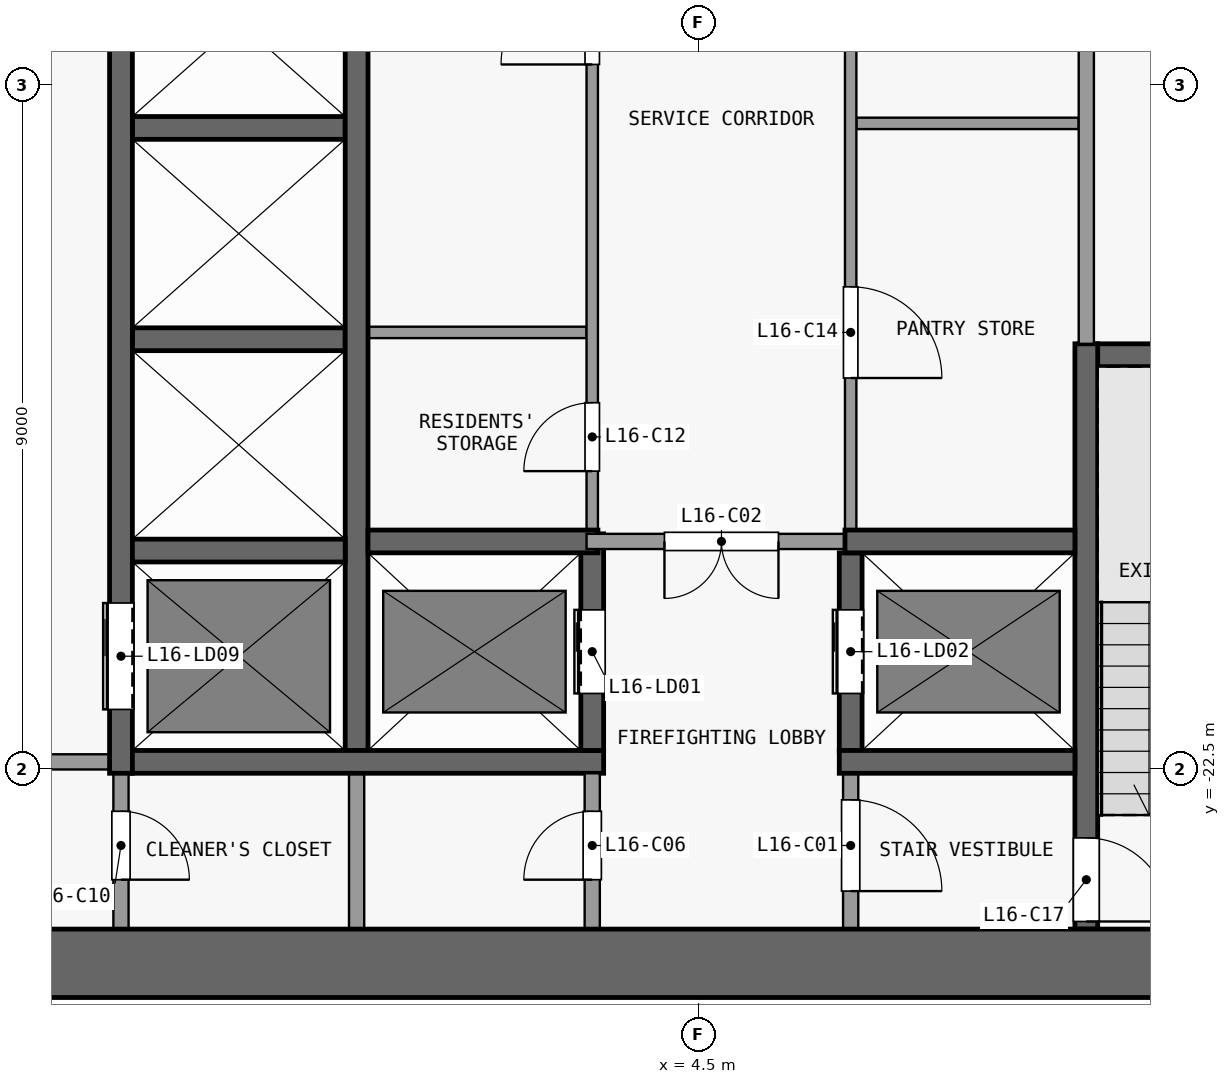
"""IFC4 building model, lengths in metres.
Left out: names, types, materials, properties, quantities, classifications, styles, units other than length and angle.
Written with IfcOpenShell. Run it as: python <this file> out.ifc"""

import sys

from ifc_helpers import new_model, si_unit, direction, frame, frame_2d, origin, place, context, subcontext, project, spatial, rectangle, extrude, element, fill, save


model = new_model("IFC4")
c1 = context("Model", 3, precision=1e-05, world=origin(), true_north=direction((0.0, 1.0)))
c2 = subcontext(c1, "Body", "Model", "MODEL_VIEW")
j1 = project(units=[si_unit("LENGTHUNIT", "METRE"), si_unit("PLANEANGLEUNIT", "RADIAN")], contexts=[c1])
p1 = place(None, origin())
s1 = spatial("IfcSite", under=j1, at=p1, CompositionType="ELEMENT")
p2 = place(p1, origin())
s2 = spatial("IfcBuilding", under=s1, at=p2, CompositionType="ELEMENT")
p3 = place(p2, frame((0.0, 0.0, 68.5)))
s3 = spatial("IfcBuildingStorey", under=s2, at=p3, CompositionType="ELEMENT", Elevation=68.5)
p4 = place(p3, frame((-13.5, -25.05, 0.0), z_axis=(0.0, 0.0, 1.0), x_axis=(1.0, 0.0, 0.0)))
e1 = element("IfcWall", 1, at=p4, inside=s3, PredefinedType="SHEAR", context=c2, shape_type="SweptSolid", body=[
    extrude(rectangle(XDim=27.0, YDim=0.9, at=frame_2d((13.5, 0.0))), origin(), (0.0, 0.0, 1.0), 3.3),
])
p5 = place(p3, frame((-3.25, -22.4, 0.0), z_axis=(0.0, 0.0, 1.0), x_axis=(-1.0, 0.0, 0.0)))
e2 = element("IfcWall", 2, at=p5, inside=s3, PredefinedType="PARTITIONING", context=c2, shape_type="SweptSolid", body=[
    extrude(rectangle(XDim=3.1, YDim=0.2, at=frame_2d((1.55, 0.0))), origin(), (0.0, 0.0, 1.0), 3.3),
])
p6 = place(p5, frame((0.8, 0.0, 0.0)))
e3 = element("IfcOpeningElement", 3, at=p6, cuts=e2, PredefinedType="OPENING", context=c2, shape_type="SweptSolid", body=[
    extrude(rectangle(XDim=1.5, YDim=2.1, at=frame_2d((0.75, 1.05))), frame((0.0, 0.11, 0.0), z_axis=(0.0, -1.0, 0.0), x_axis=(1.0, 0.0, 0.0)), (0.0, 0.0, 1.0), 0.22),
])
p7 = place(p3, frame((-2.95, -22.4, 0.0), z_axis=(0.0, 0.0, 1.0), x_axis=(1.0, 0.0, 0.0)))
e4 = element("IfcWall", 4, at=p7, inside=s3, PredefinedType="SHEAR", context=c2, shape_type="SweptSolid", body=[
    extrude(rectangle(XDim=6.2, YDim=0.3, at=frame_2d((3.1, 0.0))), origin(), (0.0, 0.0, 1.0), 3.3),
])
p8 = place(p3, frame((6.35, -22.4, 0.0), z_axis=(0.0, 0.0, 1.0), x_axis=(1.0, 0.0, 0.0)))
e5 = element("IfcWall", 5, at=p8, inside=s3, PredefinedType="SHEAR", context=c2, shape_type="SweptSolid", body=[
    extrude(rectangle(XDim=3.1, YDim=0.3, at=frame_2d((1.55, 0.0))), origin(), (0.0, 0.0, 1.0), 3.3),
])
p9 = place(p3, frame((-2.95, -19.62, 0.0), z_axis=(0.0, 0.0, 1.0), x_axis=(1.0, 0.0, 0.0)))
e6 = element("IfcWall", 6, at=p9, inside=s3, PredefinedType="SHEAR", context=c2, shape_type="SweptSolid", body=[
    extrude(rectangle(XDim=2.8, YDim=0.3, at=frame_2d((1.4, 0.0))), origin(), (0.0, 0.0, 1.0), 3.3),
])
p10 = place(p3, frame((0.15, -19.5, 0.0), z_axis=(0.0, 0.0, 1.0), x_axis=(1.0, 0.0, 0.0)))
e7 = element("IfcWall", 7, at=p10, inside=s3, PredefinedType="SHEAR", context=c2, shape_type="SweptSolid", body=[
    extrude(rectangle(XDim=3.025, YDim=0.3, at=frame_2d((1.513, 0.0))), origin(), (0.0, 0.0, 1.0), 3.3),
])
p11 = place(p3, frame((6.575, -19.5, 0.0), z_axis=(0.0, 0.0, 1.0), x_axis=(-1.0, 0.0, 0.0)))
e8 = element("IfcWall", 8, at=p11, inside=s3, PredefinedType="PARTITIONING", context=c2, shape_type="SweptSolid", body=[
    extrude(rectangle(XDim=3.55, YDim=0.2, at=frame_2d((1.775, 0.0))), origin(), (0.0, 0.0, 1.0), 3.3),
])
p12 = place(p11, frame((1.025, 0.0, 0.0)))
e9 = element("IfcOpeningElement", 9, at=p12, cuts=e8, PredefinedType="OPENING", context=c2, shape_type="SweptSolid", body=[
    extrude(rectangle(XDim=1.5, YDim=2.1, at=frame_2d((0.75, 1.05))), frame((0.0, 0.11, 0.0), z_axis=(0.0, -1.0, 0.0), x_axis=(1.0, 0.0, 0.0)), (0.0, 0.0, 1.0), 0.22),
])
p13 = place(p3, frame((6.425, -19.5, 0.0), z_axis=(0.0, 0.0, 1.0), x_axis=(1.0, 0.0, 0.0)))
e10 = element("IfcWall", 10, at=p13, inside=s3, PredefinedType="SHEAR", context=c2, shape_type="SweptSolid", body=[
    extrude(rectangle(XDim=3.025, YDim=0.3, at=frame_2d((1.512, 0.0))), origin(), (0.0, 0.0, 1.0), 3.3),
])
p14 = place(p3, frame((9.5, -17.05, 0.0), z_axis=(0.0, 0.0, 1.0), x_axis=(1.0, 0.0, 0.0)))
e11 = element("IfcWall", 11, at=p14, inside=s3, PredefinedType="SHEAR", context=c2, shape_type="SweptSolid", body=[
    extrude(rectangle(XDim=3.1, YDim=0.3, at=frame_2d((1.55, 0.0))), origin(), (0.0, 0.0, 1.0), 3.3),
])
p15 = place(p3, frame((-2.95, -16.84, 0.0), z_axis=(0.0, 0.0, 1.0), x_axis=(1.0, 0.0, 0.0)))
e12 = element("IfcWall", 12, at=p15, inside=s3, PredefinedType="SHEAR", context=c2, shape_type="SweptSolid", body=[
    extrude(rectangle(XDim=2.8, YDim=0.3, at=frame_2d((1.4, 0.0))), origin(), (0.0, 0.0, 1.0), 3.3),
])
p16 = place(p3, frame((0.15, -16.75, 0.0), z_axis=(0.0, 0.0, 1.0), x_axis=(1.0, 0.0, 0.0)))
e13 = element("IfcWall", 13, at=p16, inside=s3, PredefinedType="PARTITIONING", context=c2, shape_type="SweptSolid", body=[
    extrude(rectangle(XDim=2.875, YDim=0.15, at=frame_2d((1.438, 0.0))), origin(), (0.0, 0.0, 1.0), 3.3),
])
p17 = place(p3, frame((-2.95, -14.06, 0.0), z_axis=(0.0, 0.0, 1.0), x_axis=(1.0, 0.0, 0.0)))
e14 = element("IfcWall", 14, at=p17, inside=s3, PredefinedType="SHEAR", context=c2, shape_type="SweptSolid", body=[
    extrude(rectangle(XDim=2.8, YDim=0.3, at=frame_2d((1.4, 0.0))), origin(), (0.0, 0.0, 1.0), 3.3),
])
p18 = place(p3, frame((6.575, -14.0, 0.0), z_axis=(0.0, 0.0, 1.0), x_axis=(1.0, 0.0, 0.0)))
e15 = element("IfcWall", 15, at=p18, inside=s3, PredefinedType="PARTITIONING", context=c2, shape_type="SweptSolid", body=[
    extrude(rectangle(XDim=2.925, YDim=0.15, at=frame_2d((1.462, 0.0))), origin(), (0.0, 0.0, 1.0), 3.3),
])
p19 = place(p3, frame((-3.1, -22.55, 0.0), z_axis=(0.0, 0.0, 1.0), x_axis=(0.0, -1.0, 0.0)))
e16 = element("IfcWall", 16, at=p19, inside=s3, PredefinedType="PARTITIONING", context=c2, shape_type="SweptSolid", body=[
    extrude(rectangle(XDim=2.05, YDim=0.2, at=frame_2d((1.025, 0.0))), origin(), (0.0, 0.0, 1.0), 3.3),
])
p20 = place(p19, frame((0.5, 0.0, 0.0)))
e17 = element("IfcOpeningElement", 17, at=p20, cuts=e16, PredefinedType="OPENING", context=c2, shape_type="SweptSolid", body=[
    extrude(rectangle(XDim=0.9, YDim=2.1, at=frame_2d((0.45, 1.05))), frame((0.0, 0.11, 0.0), z_axis=(0.0, -1.0, 0.0), x_axis=(1.0, 0.0, 0.0)), (0.0, 0.0, 1.0), 0.22),
])
p21 = place(p3, frame((-3.1, -22.55, 0.0), z_axis=(0.0, 0.0, 1.0), x_axis=(0.0, 1.0, 0.0)))
e18 = element("IfcWall", 18, at=p21, inside=s3, PredefinedType="SHEAR", context=c2, shape_type="SweptSolid", body=[
    extrude(rectangle(XDim=14.05, YDim=0.3, at=frame_2d((7.025, 0.0))), origin(), (0.0, 0.0, 1.0), 3.3),
])
p22 = place(p21, frame((12.11, 0.0, 0.0)))
e19 = element("IfcOpeningElement", 19, at=p22, cuts=e18, PredefinedType="OPENING", context=c2, shape_type="SweptSolid", body=[
    extrude(rectangle(XDim=1.1, YDim=2.1, at=frame_2d((0.55, 1.05))), frame((0.0, 0.16, 0.0), z_axis=(0.0, -1.0, 0.0), x_axis=(1.0, 0.0, 0.0)), (0.0, 0.0, 1.0), 0.32),
])
p23 = place(p21, frame((0.84, 0.0, 0.0)))
e20 = element("IfcOpeningElement", 20, at=p23, cuts=e18, PredefinedType="OPENING", context=c2, shape_type="SweptSolid", body=[
    extrude(rectangle(XDim=1.4, YDim=2.1, at=frame_2d((0.7, 1.05))), frame((0.0, 0.16, 0.0), z_axis=(0.0, -1.0, 0.0), x_axis=(1.0, 0.0, 0.0)), (0.0, 0.0, 1.0), 0.32),
])
p24 = place(p3, frame((0.0, -24.6, 0.0), z_axis=(0.0, 0.0, 1.0), x_axis=(0.0, 1.0, 0.0)))
e21 = element("IfcWall", 21, at=p24, inside=s3, PredefinedType="PARTITIONING", context=c2, shape_type="SweptSolid", body=[
    extrude(rectangle(XDim=2.05, YDim=0.2, at=frame_2d((1.025, 0.0))), origin(), (0.0, 0.0, 1.0), 3.3),
])
p25 = place(p3, frame((0.0, -22.25, 0.0), z_axis=(0.0, 0.0, 1.0), x_axis=(0.0, 1.0, 0.0)))
e22 = element("IfcWall", 22, at=p25, inside=s3, PredefinedType="SHEAR", context=c2, shape_type="SweptSolid", body=[
    extrude(rectangle(XDim=13.75, YDim=0.3, at=frame_2d((6.875, 0.0))), origin(), (0.0, 0.0, 1.0), 3.3),
])
p26 = place(p3, frame((3.1, -24.6, 0.0), z_axis=(0.0, 0.0, 1.0), x_axis=(0.0, 1.0, 0.0)))
e23 = element("IfcWall", 23, at=p26, inside=s3, PredefinedType="PARTITIONING", context=c2, shape_type="SweptSolid", body=[
    extrude(rectangle(XDim=2.05, YDim=0.2, at=frame_2d((1.025, 0.0))), origin(), (0.0, 0.0, 1.0), 3.3),
])
p27 = place(p26, frame((0.65, 0.0, 0.0)))
e24 = element("IfcOpeningElement", 24, at=p27, cuts=e23, PredefinedType="OPENING", context=c2, shape_type="SweptSolid", body=[
    extrude(rectangle(XDim=0.9, YDim=2.1, at=frame_2d((0.45, 1.05))), frame((0.0, 0.11, 0.0), z_axis=(0.0, -1.0, 0.0), x_axis=(1.0, 0.0, 0.0)), (0.0, 0.0, 1.0), 0.22),
])
p28 = place(p3, frame((3.1, -22.25, 0.0), z_axis=(0.0, 0.0, 1.0), x_axis=(0.0, 1.0, 0.0)))
e25 = element("IfcWall", 25, at=p28, inside=s3, PredefinedType="SHEAR", context=c2, shape_type="SweptSolid", body=[
    extrude(rectangle(XDim=2.85, YDim=0.3, at=frame_2d((1.425, 0.0))), origin(), (0.0, 0.0, 1.0), 3.3),
])
p29 = place(p28, frame((0.75, 0.0, 0.0)))
e26 = element("IfcOpeningElement", 26, at=p29, cuts=e25, PredefinedType="OPENING", context=c2, shape_type="SweptSolid", body=[
    extrude(rectangle(XDim=1.1, YDim=2.1, at=frame_2d((0.55, 1.05))), frame((0.0, 0.16, 0.0), z_axis=(0.0, -1.0, 0.0), x_axis=(1.0, 0.0, 0.0)), (0.0, 0.0, 1.0), 0.32),
])
p30 = place(p3, frame((3.1, -19.4, 0.0), z_axis=(0.0, 0.0, 1.0), x_axis=(0.0, 1.0, 0.0)))
e27 = element("IfcWall", 27, at=p30, inside=s3, PredefinedType="PARTITIONING", context=c2, shape_type="SweptSolid", body=[
    extrude(rectangle(XDim=10.9, YDim=0.15, at=frame_2d((5.45, 0.0))), origin(), (0.0, 0.0, 1.0), 3.3),
])
p31 = place(p30, frame((0.825, 0.0, 0.0)))
e28 = element("IfcOpeningElement", 28, at=p31, cuts=e27, PredefinedType="OPENING", context=c2, shape_type="SweptSolid", body=[
    extrude(rectangle(XDim=0.9, YDim=2.1, at=frame_2d((0.45, 1.05))), frame((0.0, 0.085, 0.0), z_axis=(0.0, -1.0, 0.0), x_axis=(1.0, 0.0, 0.0)), (0.0, 0.0, 1.0), 0.17),
])
p32 = place(p30, frame((6.175, 0.0, 0.0)))
e29 = element("IfcOpeningElement", 29, at=p32, cuts=e27, PredefinedType="OPENING", context=c2, shape_type="SweptSolid", body=[
    extrude(rectangle(XDim=1.2, YDim=2.1, at=frame_2d((0.6, 1.05))), frame((0.0, 0.085, 0.0), z_axis=(0.0, -1.0, 0.0), x_axis=(1.0, 0.0, 0.0)), (0.0, 0.0, 1.0), 0.17),
])
p33 = place(p3, frame((6.5, -22.55, 0.0), z_axis=(0.0, 0.0, 1.0), x_axis=(0.0, -1.0, 0.0)))
e30 = element("IfcWall", 30, at=p33, inside=s3, PredefinedType="PARTITIONING", context=c2, shape_type="SweptSolid", body=[
    extrude(rectangle(XDim=2.05, YDim=0.2, at=frame_2d((1.025, 0.0))), origin(), (0.0, 0.0, 1.0), 3.3),
])
p34 = place(p33, frame((0.35, 0.0, 0.0)))
e31 = element("IfcOpeningElement", 31, at=p34, cuts=e30, PredefinedType="OPENING", context=c2, shape_type="SweptSolid", body=[
    extrude(rectangle(XDim=1.2, YDim=2.1, at=frame_2d((0.6, 1.05))), frame((0.0, 0.11, 0.0), z_axis=(0.0, -1.0, 0.0), x_axis=(1.0, 0.0, 0.0)), (0.0, 0.0, 1.0), 0.22),
])
p35 = place(p3, frame((6.5, -22.25, 0.0), z_axis=(0.0, 0.0, 1.0), x_axis=(0.0, 1.0, 0.0)))
e32 = element("IfcWall", 32, at=p35, inside=s3, PredefinedType="SHEAR", context=c2, shape_type="SweptSolid", body=[
    extrude(rectangle(XDim=2.6, YDim=0.3, at=frame_2d((1.3, 0.0))), origin(), (0.0, 0.0, 1.0), 3.3),
])
p36 = place(p35, frame((0.75, 0.0, 0.0)))
e33 = element("IfcOpeningElement", 33, at=p36, cuts=e32, PredefinedType="OPENING", context=c2, shape_type="SweptSolid", body=[
    extrude(rectangle(XDim=1.1, YDim=2.1, at=frame_2d((0.55, 1.05))), frame((0.0, 0.16, 0.0), z_axis=(0.0, -1.0, 0.0), x_axis=(1.0, 0.0, 0.0)), (0.0, 0.0, 1.0), 0.32),
])
p37 = place(p3, frame((6.5, -8.5, 0.0), z_axis=(0.0, 0.0, 1.0), x_axis=(0.0, -1.0, 0.0)))
e34 = element("IfcWall", 34, at=p37, inside=s3, PredefinedType="PARTITIONING", context=c2, shape_type="SweptSolid", body=[
    extrude(rectangle(XDim=10.85, YDim=0.15, at=frame_2d((5.425, 0.0))), origin(), (0.0, 0.0, 1.0), 3.3),
])
p38 = place(p37, frame((7.65, 0.0, 0.0)))
e35 = element("IfcOpeningElement", 35, at=p38, cuts=e34, PredefinedType="OPENING", context=c2, shape_type="SweptSolid", body=[
    extrude(rectangle(XDim=1.2, YDim=2.1, at=frame_2d((0.6, 1.05))), frame((0.0, 0.085, 0.0), z_axis=(0.0, -1.0, 0.0), x_axis=(1.0, 0.0, 0.0)), (0.0, 0.0, 1.0), 0.17),
])
p39 = place(p37, frame((2.15, 0.0, 0.0)))
e36 = element("IfcOpeningElement", 36, at=p39, cuts=e34, PredefinedType="OPENING", context=c2, shape_type="SweptSolid", body=[
    extrude(rectangle(XDim=1.2, YDim=2.1, at=frame_2d((0.6, 1.05))), frame((0.0, 0.085, 0.0), z_axis=(0.0, -1.0, 0.0), x_axis=(1.0, 0.0, 0.0)), (0.0, 0.0, 1.0), 0.17),
])
p40 = place(p3, frame((9.6, -16.9, 0.0), z_axis=(0.0, 0.0, 1.0), x_axis=(0.0, -1.0, 0.0)))
e37 = element("IfcWall", 37, at=p40, inside=s3, PredefinedType="SHEAR", context=c2, shape_type="SweptSolid", body=[
    extrude(rectangle(XDim=7.7, YDim=0.3, at=frame_2d((3.85, 0.0))), origin(), (0.0, 0.0, 1.0), 3.3),
])
p41 = place(p40, frame((6.5, 0.0, 0.0)))
e38 = element("IfcOpeningElement", 38, at=p41, cuts=e37, PredefinedType="OPENING", context=c2, shape_type="SweptSolid", body=[
    extrude(rectangle(XDim=1.1, YDim=2.1, at=frame_2d((0.55, 1.05))), frame((0.0, 0.16, 0.0), z_axis=(0.0, -1.0, 0.0), x_axis=(1.0, 0.0, 0.0)), (0.0, 0.0, 1.0), 0.32),
])
p42 = place(p3, frame((9.6, -16.9, 0.0), z_axis=(0.0, 0.0, 1.0), x_axis=(0.0, 1.0, 0.0)))
e39 = element("IfcWall", 39, at=p42, inside=s3, PredefinedType="PARTITIONING", context=c2, shape_type="SweptSolid", body=[
    extrude(rectangle(XDim=8.4, YDim=0.2, at=frame_2d((4.2, 0.0))), origin(), (0.0, 0.0, 1.0), 3.3),
])
p43 = place(p29, origin())
e40 = element("IfcDoor", 40, at=p43, inside=s3, OperationType="DOUBLE_DOOR_SLIDING", PredefinedType="DOOR", context=c2, shape_type="SweptSolid", body=[
    extrude(rectangle(XDim=1.1, YDim=2.1, at=frame_2d((0.55, 1.05))), frame((0.0, 0.025, 0.0), z_axis=(0.0, -1.0, 0.0), x_axis=(1.0, 0.0, 0.0)), (0.0, 0.0, 1.0), 0.05),
])
fill(e26, e40)
p44 = place(p36, origin())
e41 = element("IfcDoor", 41, at=p44, inside=s3, OperationType="DOUBLE_DOOR_SLIDING", PredefinedType="DOOR", context=c2, shape_type="SweptSolid", body=[
    extrude(rectangle(XDim=1.1, YDim=2.1, at=frame_2d((0.55, 1.05))), frame((0.0, 0.025, 0.0), z_axis=(0.0, -1.0, 0.0), x_axis=(1.0, 0.0, 0.0)), (0.0, 0.0, 1.0), 0.05),
])
fill(e33, e41)
p45 = place(p23, origin())
e42 = element("IfcDoor", 42, at=p45, inside=s3, OperationType="DOUBLE_DOOR_SLIDING", PredefinedType="DOOR", context=c2, shape_type="SweptSolid", body=[
    extrude(rectangle(XDim=1.4, YDim=2.1, at=frame_2d((0.7, 1.05))), frame((0.0, 0.025, 0.0), z_axis=(0.0, -1.0, 0.0), x_axis=(1.0, 0.0, 0.0)), (0.0, 0.0, 1.0), 0.05),
])
fill(e20, e42)
p46 = place(p34, origin())
e43 = element("IfcDoor", 43, at=p46, inside=s3, OperationType="SINGLE_SWING_RIGHT", PredefinedType="DOOR", context=c2, shape_type="SweptSolid", body=[
    extrude(rectangle(XDim=1.2, YDim=2.1, at=frame_2d((0.6, 1.05))), frame((0.0, 0.025, 0.0), z_axis=(0.0, -1.0, 0.0), x_axis=(1.0, 0.0, 0.0)), (0.0, 0.0, 1.0), 0.05),
])
fill(e31, e43)
p47 = place(p12, origin())
e44 = element("IfcDoor", 44, at=p47, inside=s3, OperationType="DOUBLE_DOOR_SINGLE_SWING", PredefinedType="DOOR", context=c2, shape_type="SweptSolid", body=[
    extrude(rectangle(XDim=1.5, YDim=2.1, at=frame_2d((0.75, 1.05))), frame((0.0, 0.025, 0.0), z_axis=(0.0, -1.0, 0.0), x_axis=(1.0, 0.0, 0.0)), (0.0, 0.0, 1.0), 0.05),
])
fill(e9, e44)
p48 = place(p27, origin())
e45 = element("IfcDoor", 45, at=p48, inside=s3, OperationType="SINGLE_SWING_LEFT", PredefinedType="DOOR", context=c2, shape_type="SweptSolid", body=[
    extrude(rectangle(XDim=0.9, YDim=2.1, at=frame_2d((0.45, 1.05))), frame((0.0, 0.025, 0.0), z_axis=(0.0, -1.0, 0.0), x_axis=(1.0, 0.0, 0.0)), (0.0, 0.0, 1.0), 0.05),
])
fill(e24, e45)
p49 = place(p20, origin())
e46 = element("IfcDoor", 46, at=p49, inside=s3, OperationType="SINGLE_SWING_RIGHT", PredefinedType="DOOR", context=c2, shape_type="SweptSolid", body=[
    extrude(rectangle(XDim=0.9, YDim=2.1, at=frame_2d((0.45, 1.05))), frame((0.0, 0.025, 0.0), z_axis=(0.0, -1.0, 0.0), x_axis=(1.0, 0.0, 0.0)), (0.0, 0.0, 1.0), 0.05),
])
fill(e17, e46)
p50 = place(p31, origin())
e47 = element("IfcDoor", 47, at=p50, inside=s3, OperationType="SINGLE_SWING_LEFT", PredefinedType="DOOR", context=c2, shape_type="SweptSolid", body=[
    extrude(rectangle(XDim=0.9, YDim=2.1, at=frame_2d((0.45, 1.05))), frame((0.0, 0.025, 0.0), z_axis=(0.0, -1.0, 0.0), x_axis=(1.0, 0.0, 0.0)), (0.0, 0.0, 1.0), 0.05),
])
fill(e28, e47)
p51 = place(p32, origin())
e48 = element("IfcDoor", 48, at=p51, inside=s3, OperationType="SINGLE_SWING_LEFT", PredefinedType="DOOR", context=c2, shape_type="SweptSolid", body=[
    extrude(rectangle(XDim=1.2, YDim=2.1, at=frame_2d((0.6, 1.05))), frame((0.0, 0.025, 0.0), z_axis=(0.0, -1.0, 0.0), x_axis=(1.0, 0.0, 0.0)), (0.0, 0.0, 1.0), 0.05),
])
fill(e29, e48)
p52 = place(p38, origin())
e49 = element("IfcDoor", 49, at=p52, inside=s3, OperationType="SINGLE_SWING_RIGHT", PredefinedType="DOOR", context=c2, shape_type="SweptSolid", body=[
    extrude(rectangle(XDim=1.2, YDim=2.1, at=frame_2d((0.6, 1.05))), frame((0.0, 0.025, 0.0), z_axis=(0.0, -1.0, 0.0), x_axis=(1.0, 0.0, 0.0)), (0.0, 0.0, 1.0), 0.05),
])
fill(e35, e49)
p53 = place(p41, origin())
e50 = element("IfcDoor", 50, at=p53, inside=s3, OperationType="SINGLE_SWING_RIGHT", PredefinedType="DOOR", context=c2, shape_type="SweptSolid", body=[
    extrude(rectangle(XDim=1.1, YDim=2.1, at=frame_2d((0.55, 1.05))), frame((0.0, 0.025, 0.0), z_axis=(0.0, -1.0, 0.0), x_axis=(1.0, 0.0, 0.0)), (0.0, 0.0, 1.0), 0.05),
])
fill(e38, e50)
save(model, sys.argv[1])
